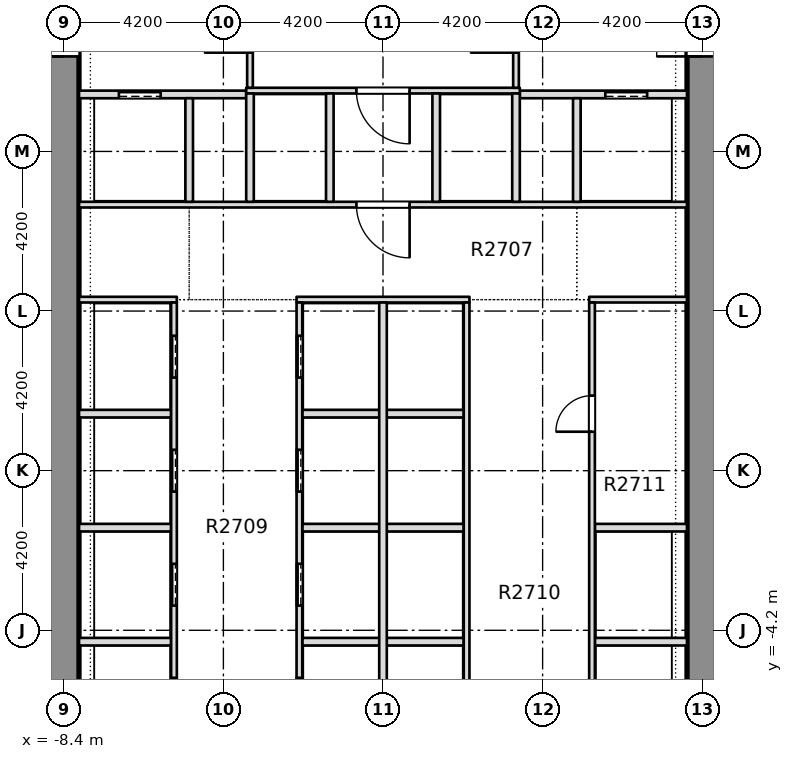
"""IFC4 building model, lengths in metres.
Left out: names, types, materials, properties, quantities, classifications, styles, units other than length and angle.
Written with IfcOpenShell. Run it as: python <this file> out.ifc"""

import sys

from ifc_helpers import new_model, si_unit, direction, frame, frame_2d, origin, place, context, subcontext, project, spatial, rectangle, extrude, element, fill, save


model = new_model("IFC4")
c1 = context("Model", 3, precision=1e-05, world=origin(), true_north=direction((0.0, 1.0)))
c2 = subcontext(c1, "Body", "Model", "MODEL_VIEW")
j1 = project(units=[si_unit("LENGTHUNIT", "METRE"), si_unit("PLANEANGLEUNIT", "RADIAN")], contexts=[c1])
p1 = place(None, origin())
s1 = spatial("IfcSite", under=j1, at=p1, CompositionType="ELEMENT")
p2 = place(p1, origin())
s2 = spatial("IfcBuilding", under=s1, at=p2, CompositionType="ELEMENT")
p3 = place(p2, frame((0.0, 0.0, 108.0)))
s3 = spatial("IfcBuildingStorey", under=s2, at=p3, CompositionType="ELEMENT", Elevation=108.0)
p4 = place(p3, frame((-8.4, -7.6, -0.32), z_axis=(0.0, 0.0, 1.0), x_axis=(0.0, 1.0, 0.0)))
e1 = element("IfcWall", 1, at=p4, inside=s3, PredefinedType="SHEAR", context=c2, shape_type="SweptSolid", body=[
    extrude(rectangle(XDim=28.55, YDim=0.8, at=frame_2d((14.275, 0.0))), origin(), (0.0, 0.0, 1.0), 3.45),
])
p5 = place(p4, frame((18.5, 0.0, 0.32)))
e2 = element("IfcOpeningElement", 2, at=p5, cuts=e1, PredefinedType="OPENING", context=c2, shape_type="SweptSolid", body=[
    extrude(rectangle(XDim=1.2, YDim=2.1, at=frame_2d((0.6, 1.05))), frame((0.0, 0.41, 0.0), z_axis=(0.0, -1.0, 0.0), x_axis=(1.0, 0.0, 0.0)), (0.0, 0.0, 1.0), 0.82),
])
p6 = place(p3, frame((8.4, -7.6, -0.32), z_axis=(0.0, 0.0, 1.0), x_axis=(0.0, 1.0, 0.0)))
e3 = element("IfcWall", 3, at=p6, inside=s3, PredefinedType="SHEAR", context=c2, shape_type="SweptSolid", body=[
    extrude(rectangle(XDim=28.55, YDim=0.8, at=frame_2d((14.275, 0.0))), origin(), (0.0, 0.0, 1.0), 3.45),
])
p7 = place(p6, frame((18.5, 0.0, 0.32)))
e4 = element("IfcOpeningElement", 4, at=p7, cuts=e3, PredefinedType="OPENING", context=c2, shape_type="SweptSolid", body=[
    extrude(rectangle(XDim=1.2, YDim=2.1, at=frame_2d((0.6, 1.05))), frame((0.0, 0.41, 0.0), z_axis=(0.0, -1.0, 0.0), x_axis=(1.0, 0.0, 0.0)), (0.0, 0.0, 1.0), 0.82),
])
p8 = place(p3, frame((-7.999, -4.5, 0.0), z_axis=(0.0, 0.0, 1.0), x_axis=(1.0, 0.0, 0.0)))
e5 = element("IfcWall", 5, at=p8, inside=s3, PredefinedType="PARTITIONING", context=c2, shape_type="SweptSolid", body=[
    extrude(rectangle(XDim=2.424, YDim=0.2, at=frame_2d((1.212, 0.0))), origin(), (0.0, 0.0, 1.0), 3.13),
])
p9 = place(p3, frame((-2.125, -4.5, 0.0), z_axis=(0.0, 0.0, 1.0), x_axis=(1.0, 0.0, 0.0)))
e6 = element("IfcWall", 6, at=p9, inside=s3, PredefinedType="PARTITIONING", context=c2, shape_type="SweptSolid", body=[
    extrude(rectangle(XDim=4.25, YDim=0.2, at=frame_2d((2.125, 0.0))), origin(), (0.0, 0.0, 1.0), 3.13),
])
for number, where, z_axis, x_axis in (
    (7, (5.575, -4.5, 0.0), (0.0, 0.0, 1.0), (1.0, 0.0, 0.0)),
    (8, (-7.999, -1.5, 0.0), (0.0, 0.0, 1.0), (1.0, 0.0, 0.0)),
):
    element("IfcWall", number, at=place(p3, frame(where, z_axis=z_axis, x_axis=x_axis)), inside=s3, PredefinedType="PARTITIONING", context=c2, shape_type="SweptSolid", body=[
        extrude(rectangle(XDim=2.424, YDim=0.2, at=frame_2d((1.212, 0.0))), origin(), (0.0, 0.0, 1.0), 3.13),
    ])
p10 = place(p3, frame((-2.125, -1.5, 0.0), z_axis=(0.0, 0.0, 1.0), x_axis=(1.0, 0.0, 0.0)))
e9 = element("IfcWall", 9, at=p10, inside=s3, PredefinedType="PARTITIONING", context=c2, shape_type="SweptSolid", body=[
    extrude(rectangle(XDim=4.25, YDim=0.2, at=frame_2d((2.125, 0.0))), origin(), (0.0, 0.0, 1.0), 3.13),
])
for number, where, z_axis, x_axis in (
    (10, (5.575, -1.5, 0.0), (0.0, 0.0, 1.0), (1.0, 0.0, 0.0)),
    (11, (-7.999, 1.5, 0.0), (0.0, 0.0, 1.0), (1.0, 0.0, 0.0)),
):
    element("IfcWall", number, at=place(p3, frame(where, z_axis=z_axis, x_axis=x_axis)), inside=s3, PredefinedType="PARTITIONING", context=c2, shape_type="SweptSolid", body=[
        extrude(rectangle(XDim=2.424, YDim=0.2, at=frame_2d((1.212, 0.0))), origin(), (0.0, 0.0, 1.0), 3.13),
    ])
p11 = place(p3, frame((-2.125, 1.5, 0.0), z_axis=(0.0, 0.0, 1.0), x_axis=(1.0, 0.0, 0.0)))
e12 = element("IfcWall", 12, at=p11, inside=s3, PredefinedType="PARTITIONING", context=c2, shape_type="SweptSolid", body=[
    extrude(rectangle(XDim=4.25, YDim=0.2, at=frame_2d((2.125, 0.0))), origin(), (0.0, 0.0, 1.0), 3.13),
])
p12 = place(p3, frame((-7.999, 4.5, 0.0), z_axis=(0.0, 0.0, 1.0), x_axis=(1.0, 0.0, 0.0)))
e13 = element("IfcWall", 13, at=p12, inside=s3, PredefinedType="PARTITIONING", context=c2, shape_type="SweptSolid", body=[
    extrude(rectangle(XDim=2.574, YDim=0.15, at=frame_2d((1.287, 0.0))), origin(), (0.0, 0.0, 1.0), 3.13),
])
p13 = place(p3, frame((-2.275, 4.5, 0.0), z_axis=(0.0, 0.0, 1.0), x_axis=(1.0, 0.0, 0.0)))
e14 = element("IfcWall", 14, at=p13, inside=s3, PredefinedType="PARTITIONING", context=c2, shape_type="SweptSolid", body=[
    extrude(rectangle(XDim=4.55, YDim=0.15, at=frame_2d((2.275, 0.0))), origin(), (0.0, 0.0, 1.0), 3.13),
])
p14 = place(p3, frame((5.425, 4.5, 0.0), z_axis=(0.0, 0.0, 1.0), x_axis=(1.0, 0.0, 0.0)))
e15 = element("IfcWall", 15, at=p14, inside=s3, PredefinedType="PARTITIONING", context=c2, shape_type="SweptSolid", body=[
    extrude(rectangle(XDim=2.574, YDim=0.15, at=frame_2d((1.287, 0.0))), origin(), (0.0, 0.0, 1.0), 3.13),
])
p15 = place(p3, frame((-7.999, 7.0, 0.0), z_axis=(0.0, 0.0, 1.0), x_axis=(1.0, 0.0, 0.0)))
e16 = element("IfcWall", 16, at=p15, inside=s3, PredefinedType="PARTITIONING", context=c2, shape_type="SweptSolid", body=[
    extrude(rectangle(XDim=15.998, YDim=0.15, at=frame_2d((7.999, 0.0))), origin(), (0.0, 0.0, 1.0), 3.13),
])
p16 = place(p15, frame((7.299, 0.0, 0.0)))
e17 = element("IfcOpeningElement", 17, at=p16, cuts=e16, PredefinedType="OPENING", context=c2, shape_type="SweptSolid", body=[
    extrude(rectangle(XDim=1.4, YDim=2.1, at=frame_2d((0.7, 1.05))), frame((0.0, 0.085, 0.0), z_axis=(0.0, -1.0, 0.0), x_axis=(1.0, 0.0, 0.0)), (0.0, 0.0, 1.0), 0.17),
])
p17 = place(p3, frame((-7.999, 9.9, 0.0), z_axis=(0.0, 0.0, 1.0), x_axis=(1.0, 0.0, 0.0)))
e18 = element("IfcWall", 18, at=p17, inside=s3, PredefinedType="PARTITIONING", context=c2, shape_type="SweptSolid", body=[
    extrude(rectangle(XDim=4.399, YDim=0.2, at=frame_2d((2.199, 0.0))), origin(), (0.0, 0.0, 1.0), 3.13),
])
p18 = place(p17, frame((1.049, 0.0, 0.0)))
e19 = element("IfcOpeningElement", 19, at=p18, cuts=e18, PredefinedType="OPENING", context=c2, shape_type="SweptSolid", body=[
    extrude(rectangle(XDim=1.1, YDim=2.1, at=frame_2d((0.55, 1.05))), frame((0.0, 0.11, 0.0), z_axis=(0.0, -1.0, 0.0), x_axis=(1.0, 0.0, 0.0)), (0.0, 0.0, 1.0), 0.22),
])
p19 = place(p3, frame((3.6, 9.9, 0.0), z_axis=(0.0, 0.0, 1.0), x_axis=(1.0, 0.0, 0.0)))
e20 = element("IfcWall", 20, at=p19, inside=s3, PredefinedType="PARTITIONING", context=c2, shape_type="SweptSolid", body=[
    extrude(rectangle(XDim=4.399, YDim=0.2, at=frame_2d((2.199, 0.0))), origin(), (0.0, 0.0, 1.0), 3.13),
])
p20 = place(p19, frame((2.25, 0.0, 0.0)))
e21 = element("IfcOpeningElement", 21, at=p20, cuts=e20, PredefinedType="OPENING", context=c2, shape_type="SweptSolid", body=[
    extrude(rectangle(XDim=1.1, YDim=2.1, at=frame_2d((0.55, 1.05))), frame((0.0, 0.11, 0.0), z_axis=(0.0, -1.0, 0.0), x_axis=(1.0, 0.0, 0.0)), (0.0, 0.0, 1.0), 0.22),
])
p21 = place(p3, frame((-3.6, 10.0, 0.0), z_axis=(0.0, 0.0, 1.0), x_axis=(1.0, 0.0, 0.0)))
e22 = element("IfcWall", 22, at=p21, inside=s3, PredefinedType="PARTITIONING", context=c2, shape_type="SweptSolid", body=[
    extrude(rectangle(XDim=7.2, YDim=0.15, at=frame_2d((3.6, 0.0))), origin(), (0.0, 0.0, 1.0), 3.13),
])
p22 = place(p21, frame((2.9, 0.0, 0.0)))
e23 = element("IfcOpeningElement", 23, at=p22, cuts=e22, PredefinedType="OPENING", context=c2, shape_type="SweptSolid", body=[
    extrude(rectangle(XDim=1.4, YDim=2.1, at=frame_2d((0.7, 1.05))), frame((0.0, 0.085, 0.0), z_axis=(0.0, -1.0, 0.0), x_axis=(1.0, 0.0, 0.0)), (0.0, 0.0, 1.0), 0.17),
])
p23 = place(p3, frame((-5.5, -7.599, 0.0), z_axis=(0.0, 0.0, 1.0), x_axis=(0.0, 1.0, 0.0)))
e24 = element("IfcWall", 24, at=p23, inside=s3, PredefinedType="PARTITIONING", context=c2, shape_type="SweptSolid", body=[
    extrude(rectangle(XDim=12.024, YDim=0.15, at=frame_2d((6.012, 0.0))), origin(), (0.0, 0.0, 1.0), 3.13),
])
p24 = place(p23, frame((1.049, 0.0, 0.0)))
e25 = element("IfcOpeningElement", 25, at=p24, cuts=e24, PredefinedType="OPENING", context=c2, shape_type="SweptSolid", body=[
    extrude(rectangle(XDim=1.1, YDim=2.1, at=frame_2d((0.55, 1.05))), frame((0.0, 0.085, 0.0), z_axis=(0.0, -1.0, 0.0), x_axis=(1.0, 0.0, 0.0)), (0.0, 0.0, 1.0), 0.17),
])
p25 = place(p23, frame((4.049, 0.0, 0.0)))
e26 = element("IfcOpeningElement", 26, at=p25, cuts=e24, PredefinedType="OPENING", context=c2, shape_type="SweptSolid", body=[
    extrude(rectangle(XDim=1.1, YDim=2.1, at=frame_2d((0.55, 1.05))), frame((0.0, 0.085, 0.0), z_axis=(0.0, -1.0, 0.0), x_axis=(1.0, 0.0, 0.0)), (0.0, 0.0, 1.0), 0.17),
])
p26 = place(p23, frame((7.049, 0.0, 0.0)))
e27 = element("IfcOpeningElement", 27, at=p26, cuts=e24, PredefinedType="OPENING", context=c2, shape_type="SweptSolid", body=[
    extrude(rectangle(XDim=1.1, YDim=2.1, at=frame_2d((0.55, 1.05))), frame((0.0, 0.085, 0.0), z_axis=(0.0, -1.0, 0.0), x_axis=(1.0, 0.0, 0.0)), (0.0, 0.0, 1.0), 0.17),
])
p27 = place(p23, frame((10.049, 0.0, 0.0)))
e28 = element("IfcOpeningElement", 28, at=p27, cuts=e24, PredefinedType="OPENING", context=c2, shape_type="SweptSolid", body=[
    extrude(rectangle(XDim=1.1, YDim=2.1, at=frame_2d((0.55, 1.05))), frame((0.0, 0.085, 0.0), z_axis=(0.0, -1.0, 0.0), x_axis=(1.0, 0.0, 0.0)), (0.0, 0.0, 1.0), 0.17),
])
p28 = place(p3, frame((-5.1, 7.075, 0.0), z_axis=(0.0, 0.0, 1.0), x_axis=(0.0, 1.0, 0.0)))
e29 = element("IfcWall", 29, at=p28, inside=s3, PredefinedType="PARTITIONING", context=c2, shape_type="SweptSolid", body=[
    extrude(rectangle(XDim=2.725, YDim=0.2, at=frame_2d((1.363, 0.0))), origin(), (0.0, 0.0, 1.0), 3.13),
])
p29 = place(p3, frame((-3.5, 7.075, 0.0), z_axis=(0.0, 0.0, 1.0), x_axis=(0.0, 1.0, 0.0)))
e30 = element("IfcWall", 30, at=p29, inside=s3, PredefinedType="PARTITIONING", context=c2, shape_type="SweptSolid", body=[
    extrude(rectangle(XDim=2.85, YDim=0.2, at=frame_2d((1.425, 0.0))), origin(), (0.0, 0.0, 1.0), 3.13),
])
p30 = place(p3, frame((-3.5, 10.075, 0.0), z_axis=(0.0, 0.0, 1.0), x_axis=(0.0, 1.0, 0.0)))
e31 = element("IfcWall", 31, at=p30, inside=s3, PredefinedType="PARTITIONING", context=c2, shape_type="SweptSolid", body=[
    extrude(rectangle(XDim=3.075, YDim=0.15, at=frame_2d((1.538, 0.0))), origin(), (0.0, 0.0, 1.0), 3.13),
])
p31 = place(p30, frame((0.925, 0.0, 0.0)))
e32 = element("IfcOpeningElement", 32, at=p31, cuts=e31, PredefinedType="OPENING", context=c2, shape_type="SweptSolid", body=[
    extrude(rectangle(XDim=1.2, YDim=2.1, at=frame_2d((0.6, 1.05))), frame((0.0, 0.085, 0.0), z_axis=(0.0, -1.0, 0.0), x_axis=(1.0, 0.0, 0.0)), (0.0, 0.0, 1.0), 0.17),
])
p32 = place(p3, frame((-2.2, -7.599, 0.0), z_axis=(0.0, 0.0, 1.0), x_axis=(0.0, 1.0, 0.0)))
e33 = element("IfcWall", 33, at=p32, inside=s3, PredefinedType="PARTITIONING", context=c2, shape_type="SweptSolid", body=[
    extrude(rectangle(XDim=12.024, YDim=0.15, at=frame_2d((6.012, 0.0))), origin(), (0.0, 0.0, 1.0), 3.13),
])
p33 = place(p32, frame((1.049, 0.0, 0.0)))
e34 = element("IfcOpeningElement", 34, at=p33, cuts=e33, PredefinedType="OPENING", context=c2, shape_type="SweptSolid", body=[
    extrude(rectangle(XDim=1.1, YDim=2.1, at=frame_2d((0.55, 1.05))), frame((0.0, 0.085, 0.0), z_axis=(0.0, -1.0, 0.0), x_axis=(1.0, 0.0, 0.0)), (0.0, 0.0, 1.0), 0.17),
])
p34 = place(p32, frame((4.049, 0.0, 0.0)))
e35 = element("IfcOpeningElement", 35, at=p34, cuts=e33, PredefinedType="OPENING", context=c2, shape_type="SweptSolid", body=[
    extrude(rectangle(XDim=1.1, YDim=2.1, at=frame_2d((0.55, 1.05))), frame((0.0, 0.085, 0.0), z_axis=(0.0, -1.0, 0.0), x_axis=(1.0, 0.0, 0.0)), (0.0, 0.0, 1.0), 0.17),
])
p35 = place(p32, frame((7.049, 0.0, 0.0)))
e36 = element("IfcOpeningElement", 36, at=p35, cuts=e33, PredefinedType="OPENING", context=c2, shape_type="SweptSolid", body=[
    extrude(rectangle(XDim=1.1, YDim=2.1, at=frame_2d((0.55, 1.05))), frame((0.0, 0.085, 0.0), z_axis=(0.0, -1.0, 0.0), x_axis=(1.0, 0.0, 0.0)), (0.0, 0.0, 1.0), 0.17),
])
p36 = place(p32, frame((10.049, 0.0, 0.0)))
e37 = element("IfcOpeningElement", 37, at=p36, cuts=e33, PredefinedType="OPENING", context=c2, shape_type="SweptSolid", body=[
    extrude(rectangle(XDim=1.1, YDim=2.1, at=frame_2d((0.55, 1.05))), frame((0.0, 0.085, 0.0), z_axis=(0.0, -1.0, 0.0), x_axis=(1.0, 0.0, 0.0)), (0.0, 0.0, 1.0), 0.17),
])
p37 = place(p3, frame((-1.4, 7.075, 0.0), z_axis=(0.0, 0.0, 1.0), x_axis=(0.0, 1.0, 0.0)))
e38 = element("IfcWall", 38, at=p37, inside=s3, PredefinedType="PARTITIONING", context=c2, shape_type="SweptSolid", body=[
    extrude(rectangle(XDim=2.85, YDim=0.2, at=frame_2d((1.425, 0.0))), origin(), (0.0, 0.0, 1.0), 3.13),
])
p38 = place(p3, frame((0.0, -7.599, 0.0), z_axis=(0.0, 0.0, 1.0), x_axis=(0.0, 1.0, 0.0)))
e39 = element("IfcWall", 39, at=p38, inside=s3, PredefinedType="PARTITIONING", context=c2, shape_type="SweptSolid", body=[
    extrude(rectangle(XDim=12.024, YDim=0.2, at=frame_2d((6.012, 0.0))), origin(), (0.0, 0.0, 1.0), 3.13),
])
p39 = place(p3, frame((1.4, 7.075, 0.0), z_axis=(0.0, 0.0, 1.0), x_axis=(0.0, 1.0, 0.0)))
e40 = element("IfcWall", 40, at=p39, inside=s3, PredefinedType="PARTITIONING", context=c2, shape_type="SweptSolid", body=[
    extrude(rectangle(XDim=2.85, YDim=0.2, at=frame_2d((1.425, 0.0))), origin(), (0.0, 0.0, 1.0), 3.13),
])
p40 = place(p3, frame((2.2, -7.599, 0.0), z_axis=(0.0, 0.0, 1.0), x_axis=(0.0, 1.0, 0.0)))
e41 = element("IfcWall", 41, at=p40, inside=s3, PredefinedType="PARTITIONING", context=c2, shape_type="SweptSolid", body=[
    extrude(rectangle(XDim=12.024, YDim=0.15, at=frame_2d((6.012, 0.0))), origin(), (0.0, 0.0, 1.0), 3.13),
])
p41 = place(p3, frame((3.5, 7.075, 0.0), z_axis=(0.0, 0.0, 1.0), x_axis=(0.0, 1.0, 0.0)))
e42 = element("IfcWall", 42, at=p41, inside=s3, PredefinedType="PARTITIONING", context=c2, shape_type="SweptSolid", body=[
    extrude(rectangle(XDim=2.85, YDim=0.2, at=frame_2d((1.425, 0.0))), origin(), (0.0, 0.0, 1.0), 3.13),
])
p42 = place(p3, frame((3.5, 10.075, 0.0), z_axis=(0.0, 0.0, 1.0), x_axis=(0.0, 1.0, 0.0)))
e43 = element("IfcWall", 43, at=p42, inside=s3, PredefinedType="PARTITIONING", context=c2, shape_type="SweptSolid", body=[
    extrude(rectangle(XDim=3.075, YDim=0.15, at=frame_2d((1.538, 0.0))), origin(), (0.0, 0.0, 1.0), 3.13),
])
p43 = place(p42, frame((0.925, 0.0, 0.0)))
e44 = element("IfcOpeningElement", 44, at=p43, cuts=e43, PredefinedType="OPENING", context=c2, shape_type="SweptSolid", body=[
    extrude(rectangle(XDim=1.2, YDim=2.1, at=frame_2d((0.6, 1.05))), frame((0.0, 0.085, 0.0), z_axis=(0.0, -1.0, 0.0), x_axis=(1.0, 0.0, 0.0)), (0.0, 0.0, 1.0), 0.17),
])
p44 = place(p3, frame((5.1, 7.075, 0.0), z_axis=(0.0, 0.0, 1.0), x_axis=(0.0, 1.0, 0.0)))
e45 = element("IfcWall", 45, at=p44, inside=s3, PredefinedType="PARTITIONING", context=c2, shape_type="SweptSolid", body=[
    extrude(rectangle(XDim=2.725, YDim=0.2, at=frame_2d((1.363, 0.0))), origin(), (0.0, 0.0, 1.0), 3.13),
])
p45 = place(p3, frame((5.5, -7.599, 0.0), z_axis=(0.0, 0.0, 1.0), x_axis=(0.0, 1.0, 0.0)))
e46 = element("IfcWall", 46, at=p45, inside=s3, PredefinedType="PARTITIONING", context=c2, shape_type="SweptSolid", body=[
    extrude(rectangle(XDim=12.024, YDim=0.15, at=frame_2d((6.012, 0.0))), origin(), (0.0, 0.0, 1.0), 3.13),
])
p46 = place(p45, frame((8.624, 0.0, 0.0)))
e47 = element("IfcOpeningElement", 47, at=p46, cuts=e46, PredefinedType="OPENING", context=c2, shape_type="SweptSolid", body=[
    extrude(rectangle(XDim=0.95, YDim=2.1, at=frame_2d((0.475, 1.05))), frame((0.0, 0.085, 0.0), z_axis=(0.0, -1.0, 0.0), x_axis=(1.0, 0.0, 0.0)), (0.0, 0.0, 1.0), 0.17),
])
p47 = place(p24, origin())
e48 = element("IfcDoor", 48, at=p47, inside=s3, OperationType="SLIDING_TO_LEFT", PredefinedType="DOOR", context=c2, shape_type="SweptSolid", body=[
    extrude(rectangle(XDim=1.1, YDim=2.1, at=frame_2d((0.55, 1.05))), frame((0.0, 0.025, 0.0), z_axis=(0.0, -1.0, 0.0), x_axis=(1.0, 0.0, 0.0)), (0.0, 0.0, 1.0), 0.05),
])
fill(e25, e48)
p48 = place(p25, origin())
e49 = element("IfcDoor", 49, at=p48, inside=s3, OperationType="SLIDING_TO_LEFT", PredefinedType="DOOR", context=c2, shape_type="SweptSolid", body=[
    extrude(rectangle(XDim=1.1, YDim=2.1, at=frame_2d((0.55, 1.05))), frame((0.0, 0.025, 0.0), z_axis=(0.0, -1.0, 0.0), x_axis=(1.0, 0.0, 0.0)), (0.0, 0.0, 1.0), 0.05),
])
fill(e26, e49)
p49 = place(p26, origin())
e50 = element("IfcDoor", 50, at=p49, inside=s3, OperationType="SLIDING_TO_LEFT", PredefinedType="DOOR", context=c2, shape_type="SweptSolid", body=[
    extrude(rectangle(XDim=1.1, YDim=2.1, at=frame_2d((0.55, 1.05))), frame((0.0, 0.025, 0.0), z_axis=(0.0, -1.0, 0.0), x_axis=(1.0, 0.0, 0.0)), (0.0, 0.0, 1.0), 0.05),
])
fill(e27, e50)
p50 = place(p27, origin())
e51 = element("IfcDoor", 51, at=p50, inside=s3, OperationType="SLIDING_TO_LEFT", PredefinedType="DOOR", context=c2, shape_type="SweptSolid", body=[
    extrude(rectangle(XDim=1.1, YDim=2.1, at=frame_2d((0.55, 1.05))), frame((0.0, 0.025, 0.0), z_axis=(0.0, -1.0, 0.0), x_axis=(1.0, 0.0, 0.0)), (0.0, 0.0, 1.0), 0.05),
])
fill(e28, e51)
p51 = place(p33, origin())
e52 = element("IfcDoor", 52, at=p51, inside=s3, OperationType="SLIDING_TO_LEFT", PredefinedType="DOOR", context=c2, shape_type="SweptSolid", body=[
    extrude(rectangle(XDim=1.1, YDim=2.1, at=frame_2d((0.55, 1.05))), frame((0.0, 0.025, 0.0), z_axis=(0.0, -1.0, 0.0), x_axis=(1.0, 0.0, 0.0)), (0.0, 0.0, 1.0), 0.05),
])
fill(e34, e52)
p52 = place(p34, origin())
e53 = element("IfcDoor", 53, at=p52, inside=s3, OperationType="SLIDING_TO_LEFT", PredefinedType="DOOR", context=c2, shape_type="SweptSolid", body=[
    extrude(rectangle(XDim=1.1, YDim=2.1, at=frame_2d((0.55, 1.05))), frame((0.0, 0.025, 0.0), z_axis=(0.0, -1.0, 0.0), x_axis=(1.0, 0.0, 0.0)), (0.0, 0.0, 1.0), 0.05),
])
fill(e35, e53)
p53 = place(p35, origin())
e54 = element("IfcDoor", 54, at=p53, inside=s3, OperationType="SLIDING_TO_LEFT", PredefinedType="DOOR", context=c2, shape_type="SweptSolid", body=[
    extrude(rectangle(XDim=1.1, YDim=2.1, at=frame_2d((0.55, 1.05))), frame((0.0, 0.025, 0.0), z_axis=(0.0, -1.0, 0.0), x_axis=(1.0, 0.0, 0.0)), (0.0, 0.0, 1.0), 0.05),
])
fill(e36, e54)
p54 = place(p36, origin())
e55 = element("IfcDoor", 55, at=p54, inside=s3, OperationType="SLIDING_TO_LEFT", PredefinedType="DOOR", context=c2, shape_type="SweptSolid", body=[
    extrude(rectangle(XDim=1.1, YDim=2.1, at=frame_2d((0.55, 1.05))), frame((0.0, 0.025, 0.0), z_axis=(0.0, -1.0, 0.0), x_axis=(1.0, 0.0, 0.0)), (0.0, 0.0, 1.0), 0.05),
])
fill(e37, e55)
p55 = place(p46, origin())
e56 = element("IfcDoor", 56, at=p55, inside=s3, OperationType="SINGLE_SWING_LEFT", PredefinedType="DOOR", context=c2, shape_type="SweptSolid", body=[
    extrude(rectangle(XDim=0.95, YDim=2.1, at=frame_2d((0.475, 1.05))), frame((0.0, 0.025, 0.0), z_axis=(0.0, -1.0, 0.0), x_axis=(1.0, 0.0, 0.0)), (0.0, 0.0, 1.0), 0.05),
])
fill(e47, e56)
p56 = place(p18, origin())
e57 = element("IfcDoor", 57, at=p56, inside=s3, OperationType="SLIDING_TO_LEFT", PredefinedType="DOOR", context=c2, shape_type="SweptSolid", body=[
    extrude(rectangle(XDim=1.1, YDim=2.1, at=frame_2d((0.55, 1.05))), frame((0.0, 0.025, 0.0), z_axis=(0.0, -1.0, 0.0), x_axis=(1.0, 0.0, 0.0)), (0.0, 0.0, 1.0), 0.05),
])
fill(e19, e57)
p57 = place(p20, origin())
e58 = element("IfcDoor", 58, at=p57, inside=s3, OperationType="SLIDING_TO_LEFT", PredefinedType="DOOR", context=c2, shape_type="SweptSolid", body=[
    extrude(rectangle(XDim=1.1, YDim=2.1, at=frame_2d((0.55, 1.05))), frame((0.0, 0.025, 0.0), z_axis=(0.0, -1.0, 0.0), x_axis=(1.0, 0.0, 0.0)), (0.0, 0.0, 1.0), 0.05),
])
fill(e21, e58)
p58 = place(p16, origin())
e59 = element("IfcDoor", 59, at=p58, inside=s3, OperationType="SINGLE_SWING_RIGHT", PredefinedType="DOOR", context=c2, shape_type="SweptSolid", body=[
    extrude(rectangle(XDim=1.4, YDim=2.1, at=frame_2d((0.7, 1.05))), frame((0.0, 0.025, 0.0), z_axis=(0.0, -1.0, 0.0), x_axis=(1.0, 0.0, 0.0)), (0.0, 0.0, 1.0), 0.05),
])
fill(e17, e59)
p59 = place(p22, origin())
e60 = element("IfcDoor", 60, at=p59, inside=s3, OperationType="SINGLE_SWING_RIGHT", PredefinedType="DOOR", context=c2, shape_type="SweptSolid", body=[
    extrude(rectangle(XDim=1.4, YDim=2.1, at=frame_2d((0.7, 1.05))), frame((0.0, 0.025, 0.0), z_axis=(0.0, -1.0, 0.0), x_axis=(1.0, 0.0, 0.0)), (0.0, 0.0, 1.0), 0.05),
])
fill(e23, e60)
p60 = place(p5, origin())
e61 = element("IfcDoor", 61, at=p60, inside=s3, OperationType="SINGLE_SWING_LEFT", PredefinedType="DOOR", context=c2, shape_type="SweptSolid", body=[
    extrude(rectangle(XDim=1.2, YDim=2.1, at=frame_2d((0.6, 1.05))), frame((0.0, 0.025, 0.0), z_axis=(0.0, -1.0, 0.0), x_axis=(1.0, 0.0, 0.0)), (0.0, 0.0, 1.0), 0.05),
])
fill(e2, e61)
p61 = place(p7, origin())
e62 = element("IfcDoor", 62, at=p61, inside=s3, OperationType="SINGLE_SWING_LEFT", PredefinedType="DOOR", context=c2, shape_type="SweptSolid", body=[
    extrude(rectangle(XDim=1.2, YDim=2.1, at=frame_2d((0.6, 1.05))), frame((0.0, 0.025, 0.0), z_axis=(0.0, -1.0, 0.0), x_axis=(1.0, 0.0, 0.0)), (0.0, 0.0, 1.0), 0.05),
])
fill(e4, e62)
save(model, sys.argv[1])
